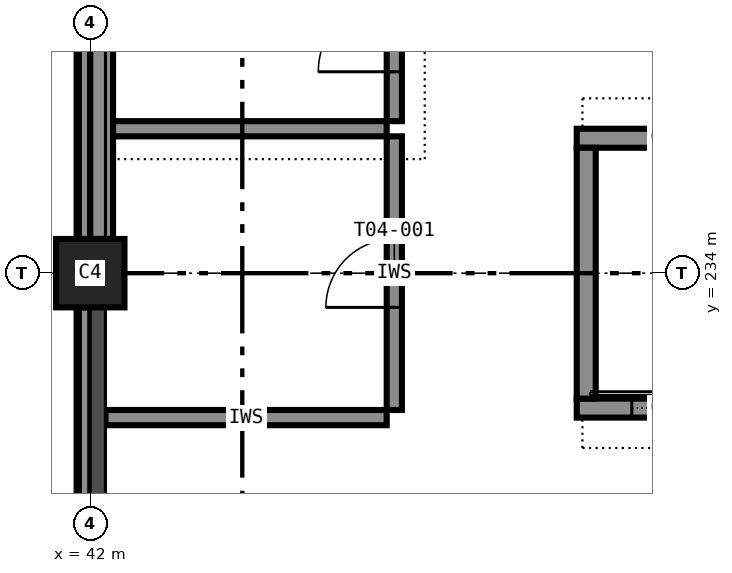
"""IFC4 building model, lengths in metres.
Left out: names, types, materials, properties, quantities, classifications, styles, units other than length and angle.
Written with IfcOpenShell. Run it as: python <this file> out.ifc"""

import sys

from ifc_helpers import new_model, si_unit, direction, frame, frame_2d, origin, origin_2d, place, context, subcontext, project, spatial, rectangle, extrude, element, fill, save


model = new_model("IFC4")
c1 = context("Model", 3, precision=1e-05, world=origin(), true_north=direction((0.0, 1.0)))
c2 = subcontext(c1, "Body", "Model", "MODEL_VIEW")
j1 = project(units=[si_unit("LENGTHUNIT", "METRE"), si_unit("PLANEANGLEUNIT", "RADIAN")], contexts=[c1])
p1 = place(None, origin())
s1 = spatial("IfcSite", under=j1, at=p1, CompositionType="ELEMENT")
p2 = place(p1, origin())
s2 = spatial("IfcBuilding", under=s1, at=p2, CompositionType="ELEMENT")
p3 = place(p2, frame((0.0, 0.0, 24.6)))
s3 = spatial("IfcBuildingStorey", under=s2, at=p3, CompositionType="ELEMENT", Elevation=24.6)
p4 = place(p3, frame((42.0, 234.0, 0.0), z_axis=(0.0, 0.0, 1.0), x_axis=(1.0, 0.0, 0.0)))
e1 = element("IfcColumn", 1, at=p4, inside=s3, PredefinedType="COLUMN", context=c2, shape_type="SweptSolid", body=[
    extrude(rectangle(XDim=0.9, YDim=0.9, at=origin_2d()), origin(), (0.0, 0.0, 1.0), 3.6),
])
p5 = place(p3, frame((48.4, 232.225, 0.0), z_axis=(0.0, 0.0, 1.0), x_axis=(1.0, 0.0, 0.0)))
e2 = element("IfcWall", 2, at=p5, inside=s3, PredefinedType="SHEAR", context=c2, shape_type="SweptSolid", body=[
    extrude(rectangle(XDim=2.55, YDim=0.25, at=frame_2d((1.275, 0.0))), origin(), (0.0, 0.0, 1.0), 3.6),
])
p6 = place(p5, frame((0.725, 0.0, 0.0)))
e3 = element("IfcOpeningElement", 3, at=p6, cuts=e2, PredefinedType="OPENING", context=c2, shape_type="SweptSolid", body=[
    extrude(rectangle(XDim=1.1, YDim=2.1, at=frame_2d((0.55, 1.05))), frame((0.0, 0.135, 0.0), z_axis=(0.0, -1.0, 0.0), x_axis=(1.0, 0.0, 0.0)), (0.0, 0.0, 1.0), 0.27),
])
p7 = place(p3, frame((48.4, 235.775, 0.0), z_axis=(0.0, 0.0, 1.0), x_axis=(1.0, 0.0, 0.0)))
e4 = element("IfcWall", 4, at=p7, inside=s3, PredefinedType="SHEAR", context=c2, shape_type="SweptSolid", body=[
    extrude(rectangle(XDim=2.55, YDim=0.25, at=frame_2d((1.275, 0.0))), origin(), (0.0, 0.0, 1.0), 3.6),
])
p8 = place(p3, frame((48.525, 232.35, 0.0), z_axis=(0.0, 0.0, 1.0), x_axis=(0.0, 1.0, 0.0)))
e5 = element("IfcWall", 5, at=p8, inside=s3, PredefinedType="SHEAR", context=c2, shape_type="SweptSolid", body=[
    extrude(rectangle(XDim=3.3, YDim=0.25, at=frame_2d((1.65, 0.0))), origin(), (0.0, 0.0, 1.0), 3.6),
])
p9 = place(p3, frame((42.15, 245.55, 0.0), z_axis=(0.0, 0.0, 1.0), x_axis=(0.0, -1.0, 0.0)))
e6 = element("IfcWall", 6, at=p9, inside=s3, PredefinedType="STANDARD", context=c2, shape_type="SweptSolid", body=[
    extrude(rectangle(XDim=11.1, YDim=0.3, at=frame_2d((5.55, 0.0))), origin(), (0.0, 0.0, 1.0), 2.6),
])
for number, where, z_axis, x_axis in (
    (7, (41.925, 245.55, 3.4), (0.0, 0.0, 1.0), (0.0, -1.0, 0.0)),
    (8, (41.925, 233.55, 3.4), (0.0, 0.0, 1.0), (0.0, -1.0, 0.0)),
):
    element("IfcWall", number, at=place(p3, frame(where, z_axis=z_axis, x_axis=x_axis)), inside=s3, PredefinedType="STANDARD", context=c2, shape_type="SweptSolid", body=[
        extrude(rectangle(XDim=11.1, YDim=0.15, at=frame_2d((5.55, 0.0))), origin(), (0.0, 0.0, 1.0), 0.2),
    ])
p10 = place(p3, frame((42.2, 232.1, 0.0), z_axis=(0.0, 0.0, 1.0), x_axis=(1.0, 0.0, 0.0)))
e9 = element("IfcWall", 9, at=p10, inside=s3, PredefinedType="PARTITIONING", context=c2, shape_type="SweptSolid", body=[
    extrude(rectangle(XDim=3.7, YDim=0.2, at=frame_2d((1.85, 0.0))), origin(), (0.0, 0.0, 1.0), 3.4),
])
p11 = place(p3, frame((42.3, 235.9, 0.0), z_axis=(0.0, 0.0, 1.0), x_axis=(1.0, 0.0, 0.0)))
e10 = element("IfcWall", 10, at=p11, inside=s3, PredefinedType="PARTITIONING", context=c2, shape_type="SweptSolid", body=[
    extrude(rectangle(XDim=3.6, YDim=0.2, at=frame_2d((1.8, 0.0))), origin(), (0.0, 0.0, 1.0), 3.4),
])
p12 = place(p3, frame((46.0, 232.2, 0.0), z_axis=(0.0, 0.0, 1.0), x_axis=(0.0, 1.0, 0.0)))
e11 = element("IfcWall", 11, at=p12, inside=s3, PredefinedType="PARTITIONING", context=c2, shape_type="SweptSolid", body=[
    extrude(rectangle(XDim=3.6, YDim=0.2, at=frame_2d((1.8, 0.0))), origin(), (0.0, 0.0, 1.0), 3.4),
])
p13 = place(p12, frame((1.35, 0.0, 0.0)))
e12 = element("IfcOpeningElement", 12, at=p13, cuts=e11, PredefinedType="OPENING", context=c2, shape_type="SweptSolid", body=[
    extrude(rectangle(XDim=0.9, YDim=2.1, at=frame_2d((0.45, 1.05))), frame((0.0, 0.11, 0.0), z_axis=(0.0, -1.0, 0.0), x_axis=(1.0, 0.0, 0.0)), (0.0, 0.0, 1.0), 0.22),
])
p14 = place(p3, frame((46.0, 236.0, 0.0), z_axis=(0.0, 0.0, 1.0), x_axis=(0.0, 1.0, 0.0)))
e13 = element("IfcWall", 13, at=p14, inside=s3, PredefinedType="PARTITIONING", context=c2, shape_type="SweptSolid", body=[
    extrude(rectangle(XDim=2.3, YDim=0.2, at=frame_2d((1.15, 0.0))), origin(), (0.0, 0.0, 1.0), 3.4),
])
p15 = place(p14, frame((0.65, 0.0, 0.0)))
e14 = element("IfcOpeningElement", 14, at=p15, cuts=e13, PredefinedType="OPENING", context=c2, shape_type="SweptSolid", body=[
    extrude(rectangle(XDim=1.0, YDim=2.1, at=frame_2d((0.5, 1.05))), frame((0.0, 0.11, 0.0), z_axis=(0.0, -1.0, 0.0), x_axis=(1.0, 0.0, 0.0)), (0.0, 0.0, 1.0), 0.22),
])
p16 = place(p13, origin())
e15 = element("IfcDoor", 15, at=p16, inside=s3, OperationType="SINGLE_SWING_LEFT", PredefinedType="DOOR", context=c2, shape_type="SweptSolid", body=[
    extrude(rectangle(XDim=0.9, YDim=2.1, at=frame_2d((0.45, 1.05))), frame((0.0, 0.025, 0.0), z_axis=(0.0, -1.0, 0.0), x_axis=(1.0, 0.0, 0.0)), (0.0, 0.0, 1.0), 0.05),
])
fill(e12, e15)
p17 = place(p15, origin())
e16 = element("IfcDoor", 16, at=p17, inside=s3, OperationType="SINGLE_SWING_LEFT", PredefinedType="DOOR", context=c2, shape_type="SweptSolid", body=[
    extrude(rectangle(XDim=1.0, YDim=2.1, at=frame_2d((0.5, 1.05))), frame((0.0, 0.025, 0.0), z_axis=(0.0, -1.0, 0.0), x_axis=(1.0, 0.0, 0.0)), (0.0, 0.0, 1.0), 0.05),
])
fill(e14, e16)
p18 = place(p6, origin())
e17 = element("IfcDoor", 17, at=p18, inside=s3, OperationType="SLIDING_TO_LEFT", PredefinedType="DOOR", context=c2, shape_type="SweptSolid", body=[
    extrude(rectangle(XDim=1.1, YDim=2.1, at=frame_2d((0.55, 1.05))), frame((0.0, 0.025, 0.0), z_axis=(0.0, -1.0, 0.0), x_axis=(1.0, 0.0, 0.0)), (0.0, 0.0, 1.0), 0.05),
])
fill(e3, e17)
save(model, sys.argv[1])
